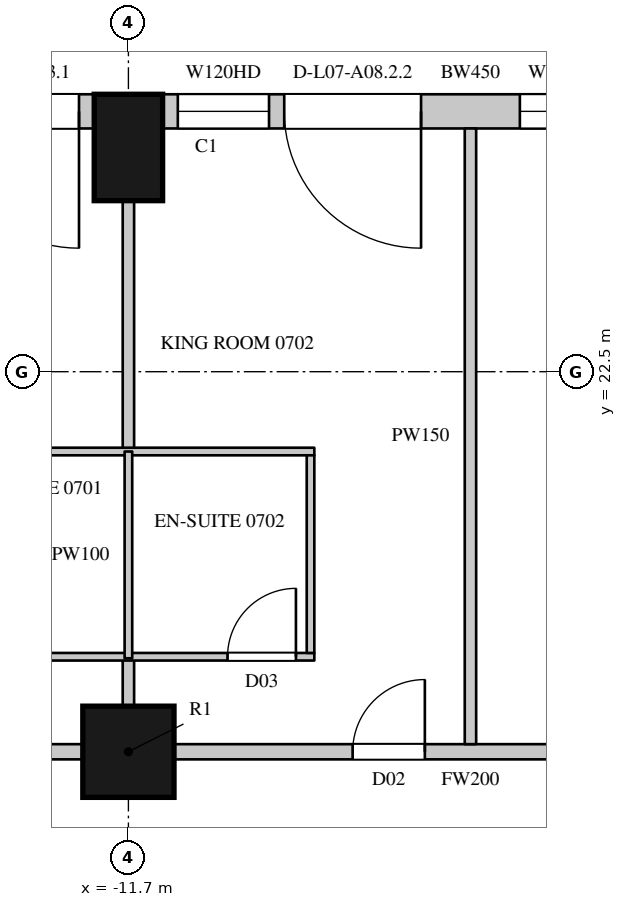
"""IFC4 building model, lengths in metres.
Left out: names, types, materials, properties, quantities, classifications, styles, units other than length and angle.
Written with IfcOpenShell. Run it as: python <this file> out.ifc"""

import sys

from ifc_helpers import new_model, si_unit, direction, frame, frame_2d, origin, origin_2d, place, context, subcontext, project, spatial, rectangle, circle, extrude, element, fill, save


model = new_model("IFC4")
c1 = context("Model", 3, precision=1e-05, world=origin(), true_north=direction((0.0, 1.0)))
c2 = subcontext(c1, "Body", "Model", "MODEL_VIEW")
j1 = project(units=[si_unit("LENGTHUNIT", "METRE"), si_unit("PLANEANGLEUNIT", "RADIAN")], contexts=[c1])
p1 = place(None, origin())
s1 = spatial("IfcSite", under=j1, at=p1, CompositionType="ELEMENT")
p2 = place(p1, origin())
s2 = spatial("IfcBuilding", under=s1, at=p2, CompositionType="ELEMENT")
p3 = place(p2, frame((0.0, 0.0, 55.5)))
s3 = spatial("IfcBuildingStorey", under=s2, at=p3, CompositionType="ELEMENT", Elevation=55.5)
p4 = place(p3, frame((-11.7, 25.45, 0.0), z_axis=(0.0, 0.0, 1.0), x_axis=(-1.0, 0.0, 0.0)))
e1 = element("IfcColumn", 1, at=p4, inside=s3, PredefinedType="COLUMN", context=c2, shape_type="SweptSolid", body=[
    extrude(rectangle(XDim=0.9, YDim=1.4, at=origin_2d()), origin(), (0.0, 0.0, 1.0), 3.6),
])
p5 = place(p3, frame((-11.7, 17.5, 0.0), z_axis=(0.0, 0.0, 1.0), x_axis=(1.0, 0.0, 0.0)))
e2 = element("IfcColumn", 2, at=p5, inside=s3, PredefinedType="COLUMN", context=c2, shape_type="SweptSolid", body=[
    extrude(circle(Radius=0.6, at=origin_2d()), origin(), (0.0, 0.0, 1.0), 3.6),
])
p6 = place(p3, frame((-3.15, 25.925, 0.0), z_axis=(0.0, 0.0, 1.0), x_axis=(-1.0, 0.0, 0.0)))
e3 = element("IfcWall", 3, at=p6, inside=s3, PredefinedType="SOLIDWALL", context=c2, shape_type="SweptSolid", body=[
    extrude(rectangle(XDim=8.1, YDim=0.45, at=frame_2d((4.05, 0.0))), origin(), (0.0, 0.0, 1.0), 3.3),
])
p7 = place(p6, frame((0.2, 0.0, 0.0)))
e4 = element("IfcOpeningElement", 4, at=p7, cuts=e3, PredefinedType="OPENING", context=c2, shape_type="SweptSolid", body=[
    extrude(rectangle(XDim=1.8, YDim=2.4, at=frame_2d((0.9, 1.2))), frame((0.0, 0.235, 0.0), z_axis=(0.0, -1.0, 0.0), x_axis=(1.0, 0.0, 0.0)), (0.0, 0.0, 1.0), 0.47),
])
p8 = place(p6, frame((2.2, 0.0, 1.05)))
e5 = element("IfcOpeningElement", 5, at=p8, cuts=e3, PredefinedType="OPENING", context=c2, shape_type="SweptSolid", body=[
    extrude(rectangle(XDim=1.2, YDim=2.0, at=frame_2d((0.6, 1.0))), frame((0.0, 0.235, 0.0), z_axis=(0.0, -1.0, 0.0), x_axis=(1.0, 0.0, 0.0)), (0.0, 0.0, 1.0), 0.47),
])
p9 = place(p6, frame((4.7, 0.0, 0.0)))
e6 = element("IfcOpeningElement", 6, at=p9, cuts=e3, PredefinedType="OPENING", context=c2, shape_type="SweptSolid", body=[
    extrude(rectangle(XDim=1.8, YDim=2.4, at=frame_2d((0.9, 1.2))), frame((0.0, 0.235, 0.0), z_axis=(0.0, -1.0, 0.0), x_axis=(1.0, 0.0, 0.0)), (0.0, 0.0, 1.0), 0.47),
])
p10 = place(p6, frame((6.7, 0.0, 1.05)))
e7 = element("IfcOpeningElement", 7, at=p10, cuts=e3, PredefinedType="OPENING", context=c2, shape_type="SweptSolid", body=[
    extrude(rectangle(XDim=1.2, YDim=2.0, at=frame_2d((0.6, 1.0))), frame((0.0, 0.235, 0.0), z_axis=(0.0, -1.0, 0.0), x_axis=(1.0, 0.0, 0.0)), (0.0, 0.0, 1.0), 0.47),
])
p11 = place(p3, frame((-12.15, 25.925, 0.0), z_axis=(0.0, 0.0, 1.0), x_axis=(-1.0, 0.0, 0.0)))
e8 = element("IfcWall", 8, at=p11, inside=s3, PredefinedType="SOLIDWALL", context=c2, shape_type="SweptSolid", body=[
    extrude(rectangle(XDim=8.1, YDim=0.45, at=frame_2d((4.05, 0.0))), origin(), (0.0, 0.0, 1.0), 3.3),
])
p12 = place(p11, frame((0.2, 0.0, 0.0)))
e9 = element("IfcOpeningElement", 9, at=p12, cuts=e8, PredefinedType="OPENING", context=c2, shape_type="SweptSolid", body=[
    extrude(rectangle(XDim=1.8, YDim=2.4, at=frame_2d((0.9, 1.2))), frame((0.0, 0.235, 0.0), z_axis=(0.0, -1.0, 0.0), x_axis=(1.0, 0.0, 0.0)), (0.0, 0.0, 1.0), 0.47),
])
p13 = place(p11, frame((2.2, 0.0, 1.05)))
e10 = element("IfcOpeningElement", 10, at=p13, cuts=e8, PredefinedType="OPENING", context=c2, shape_type="SweptSolid", body=[
    extrude(rectangle(XDim=1.2, YDim=2.0, at=frame_2d((0.6, 1.0))), frame((0.0, 0.235, 0.0), z_axis=(0.0, -1.0, 0.0), x_axis=(1.0, 0.0, 0.0)), (0.0, 0.0, 1.0), 0.47),
])
p14 = place(p11, frame((5.4, 0.0, 0.0)))
e11 = element("IfcOpeningElement", 11, at=p14, cuts=e8, PredefinedType="OPENING", context=c2, shape_type="SweptSolid", body=[
    extrude(rectangle(XDim=1.8, YDim=2.4, at=frame_2d((0.9, 1.2))), frame((0.0, 0.235, 0.0), z_axis=(0.0, -1.0, 0.0), x_axis=(1.0, 0.0, 0.0)), (0.0, 0.0, 1.0), 0.47),
])
p15 = place(p3, frame((-18.8, 17.5, 0.0), z_axis=(0.0, 0.0, 1.0), x_axis=(1.0, 0.0, 0.0)))
e12 = element("IfcWall", 12, at=p15, inside=s3, PredefinedType="PARTITIONING", context=c2, shape_type="SweptSolid", body=[
    extrude(rectangle(XDim=6.5, YDim=0.2, at=frame_2d((3.25, 0.0))), origin(), (0.0, 0.0, 1.0), 2.75),
])
p16 = place(p3, frame((-11.1, 17.5, 0.0), z_axis=(0.0, 0.0, 1.0), x_axis=(1.0, 0.0, 0.0)))
e13 = element("IfcWall", 13, at=p16, inside=s3, PredefinedType="PARTITIONING", context=c2, shape_type="SweptSolid", body=[
    extrude(rectangle(XDim=7.8, YDim=0.2, at=frame_2d((3.9, 0.0))), origin(), (0.0, 0.0, 1.0), 2.75),
])
p17 = place(p16, frame((2.35, 0.0, 0.0)))
e14 = element("IfcOpeningElement", 14, at=p17, cuts=e13, PredefinedType="OPENING", context=c2, shape_type="SweptSolid", body=[
    extrude(rectangle(XDim=0.95, YDim=2.2, at=frame_2d((0.475, 1.1))), frame((0.0, 0.11, 0.0), z_axis=(0.0, -1.0, 0.0), x_axis=(1.0, 0.0, 0.0)), (0.0, 0.0, 1.0), 0.22),
])
p18 = place(p16, frame((5.2, 0.0, 0.0)))
e15 = element("IfcOpeningElement", 15, at=p18, cuts=e13, PredefinedType="OPENING", context=c2, shape_type="SweptSolid", body=[
    extrude(rectangle(XDim=0.95, YDim=2.2, at=frame_2d((0.475, 1.1))), frame((0.0, 0.11, 0.0), z_axis=(0.0, -1.0, 0.0), x_axis=(1.0, 0.0, 0.0)), (0.0, 0.0, 1.0), 0.22),
])
p19 = place(p3, frame((-11.7, 18.1, 0.0), z_axis=(0.0, 0.0, 1.0), x_axis=(0.0, 1.0, 0.0)))
e16 = element("IfcWall", 16, at=p19, inside=s3, PredefinedType="PARTITIONING", context=c2, shape_type="SweptSolid", body=[
    extrude(rectangle(XDim=0.63, YDim=0.15, at=frame_2d((0.315, 0.0))), origin(), (0.0, 0.0, 1.0), 2.75),
])
p20 = place(p3, frame((-11.7, 21.45, 0.0), z_axis=(0.0, 0.0, 1.0), x_axis=(0.0, 1.0, 0.0)))
e17 = element("IfcWall", 17, at=p20, inside=s3, PredefinedType="PARTITIONING", context=c2, shape_type="SweptSolid", body=[
    extrude(rectangle(XDim=3.3, YDim=0.15, at=frame_2d((1.65, 0.0))), origin(), (0.0, 0.0, 1.0), 2.75),
])
p21 = place(p3, frame((-7.2, 17.6, 0.0), z_axis=(0.0, 0.0, 1.0), x_axis=(0.0, 1.0, 0.0)))
e18 = element("IfcWall", 18, at=p21, inside=s3, PredefinedType="PARTITIONING", context=c2, shape_type="SweptSolid", body=[
    extrude(rectangle(XDim=8.1, YDim=0.15, at=frame_2d((4.05, 0.0))), origin(), (0.0, 0.0, 1.0), 2.65),
])
p22 = place(p3, frame((-14.146, 18.75, 0.0), z_axis=(0.0, 0.0, 1.0), x_axis=(1.0, 0.0, 0.0)))
e19 = element("IfcWall", 19, at=p22, inside=s3, PredefinedType="PARTITIONING", context=c2, shape_type="SweptSolid", body=[
    extrude(rectangle(XDim=4.892, YDim=0.1, at=frame_2d((2.446, 0.0))), origin(), (0.0, 0.0, 1.0), 3.3),
])
p23 = place(p22, frame((3.75, 0.0, 0.0)))
e20 = element("IfcOpeningElement", 20, at=p23, cuts=e19, PredefinedType="OPENING", context=c2, shape_type="SweptSolid", body=[
    extrude(rectangle(XDim=0.9, YDim=2.2, at=frame_2d((0.45, 1.1))), frame((0.0, 0.06, 0.0), z_axis=(0.0, -1.0, 0.0), x_axis=(1.0, 0.0, 0.0)), (0.0, 0.0, 1.0), 0.12),
])
p24 = place(p3, frame((-14.146, 21.45, 0.0), z_axis=(0.0, 0.0, 1.0), x_axis=(1.0, 0.0, 0.0)))
e21 = element("IfcWall", 21, at=p24, inside=s3, PredefinedType="PARTITIONING", context=c2, shape_type="SweptSolid", body=[
    extrude(rectangle(XDim=4.892, YDim=0.1, at=frame_2d((2.446, 0.0))), origin(), (0.0, 0.0, 1.0), 3.3),
])
p25 = place(p3, frame((-11.7, 18.73, 0.0), z_axis=(0.0, 0.0, 1.0), x_axis=(0.0, 1.0, 0.0)))
e22 = element("IfcWall", 22, at=p25, inside=s3, PredefinedType="PARTITIONING", context=c2, shape_type="SweptSolid", body=[
    extrude(rectangle(XDim=2.72, YDim=0.1, at=frame_2d((1.36, 0.0))), origin(), (0.0, 0.0, 1.0), 2.75),
])
p26 = place(p3, frame((-9.304, 18.8, 0.0), z_axis=(0.0, 0.0, 1.0), x_axis=(0.0, 1.0, 0.0)))
e23 = element("IfcWall", 23, at=p26, inside=s3, PredefinedType="PARTITIONING", context=c2, shape_type="SweptSolid", body=[
    extrude(rectangle(XDim=2.6, YDim=0.1, at=frame_2d((1.3, 0.0))), origin(), (0.0, 0.0, 1.0), 3.3),
])
p27 = place(p8, origin())
e24 = element("IfcWindow", 24, at=p27, inside=s3, PartitioningType="SINGLE_PANEL", PredefinedType="WINDOW", context=c2, shape_type="SweptSolid", body=[
    extrude(rectangle(XDim=1.2, YDim=2.0, at=frame_2d((0.6, 1.0))), frame((0.0, 0.135, 0.0), z_axis=(0.0, -1.0, 0.0), x_axis=(1.0, 0.0, 0.0)), (0.0, 0.0, 1.0), 0.06),
])
fill(e5, e24)
p28 = place(p9, origin())
e25 = element("IfcDoor", 25, at=p28, inside=s3, OperationType="SLIDING_TO_LEFT", PredefinedType="DOOR", context=c2, shape_type="SweptSolid", body=[
    extrude(rectangle(XDim=1.8, YDim=2.4, at=frame_2d((0.9, 1.2))), frame((0.0, 0.13, 0.0), z_axis=(0.0, -1.0, 0.0), x_axis=(1.0, 0.0, 0.0)), (0.0, 0.0, 1.0), 0.05),
])
fill(e6, e25)
p29 = place(p10, origin())
e26 = element("IfcWindow", 26, at=p29, inside=s3, PartitioningType="SINGLE_PANEL", PredefinedType="WINDOW", context=c2, shape_type="SweptSolid", body=[
    extrude(rectangle(XDim=1.2, YDim=2.0, at=frame_2d((0.6, 1.0))), frame((0.0, 0.135, 0.0), z_axis=(0.0, -1.0, 0.0), x_axis=(1.0, 0.0, 0.0)), (0.0, 0.0, 1.0), 0.06),
])
fill(e7, e26)
p30 = place(p12, origin())
e27 = element("IfcDoor", 27, at=p30, inside=s3, OperationType="SLIDING_TO_LEFT", PredefinedType="DOOR", context=c2, shape_type="SweptSolid", body=[
    extrude(rectangle(XDim=1.8, YDim=2.4, at=frame_2d((0.9, 1.2))), frame((0.0, 0.13, 0.0), z_axis=(0.0, -1.0, 0.0), x_axis=(1.0, 0.0, 0.0)), (0.0, 0.0, 1.0), 0.05),
])
fill(e9, e27)
p31 = place(p17, origin())
e28 = element("IfcDoor", 28, at=p31, inside=s3, OperationType="SINGLE_SWING_RIGHT", PredefinedType="DOOR", context=c2, shape_type="SweptSolid", body=[
    extrude(rectangle(XDim=0.95, YDim=2.2, at=frame_2d((0.475, 1.1))), frame((0.0, 0.025, 0.0), z_axis=(0.0, -1.0, 0.0), x_axis=(1.0, 0.0, 0.0)), (0.0, 0.0, 1.0), 0.05),
])
fill(e14, e28)
p32 = place(p23, origin())
e29 = element("IfcDoor", 29, at=p32, inside=s3, OperationType="SINGLE_SWING_RIGHT", PredefinedType="DOOR", context=c2, shape_type="SweptSolid", body=[
    extrude(rectangle(XDim=0.9, YDim=2.2, at=frame_2d((0.45, 1.1))), frame((0.0, 0.025, 0.0), z_axis=(0.0, -1.0, 0.0), x_axis=(1.0, 0.0, 0.0)), (0.0, 0.0, 1.0), 0.05),
])
fill(e20, e29)
save(model, sys.argv[1])
